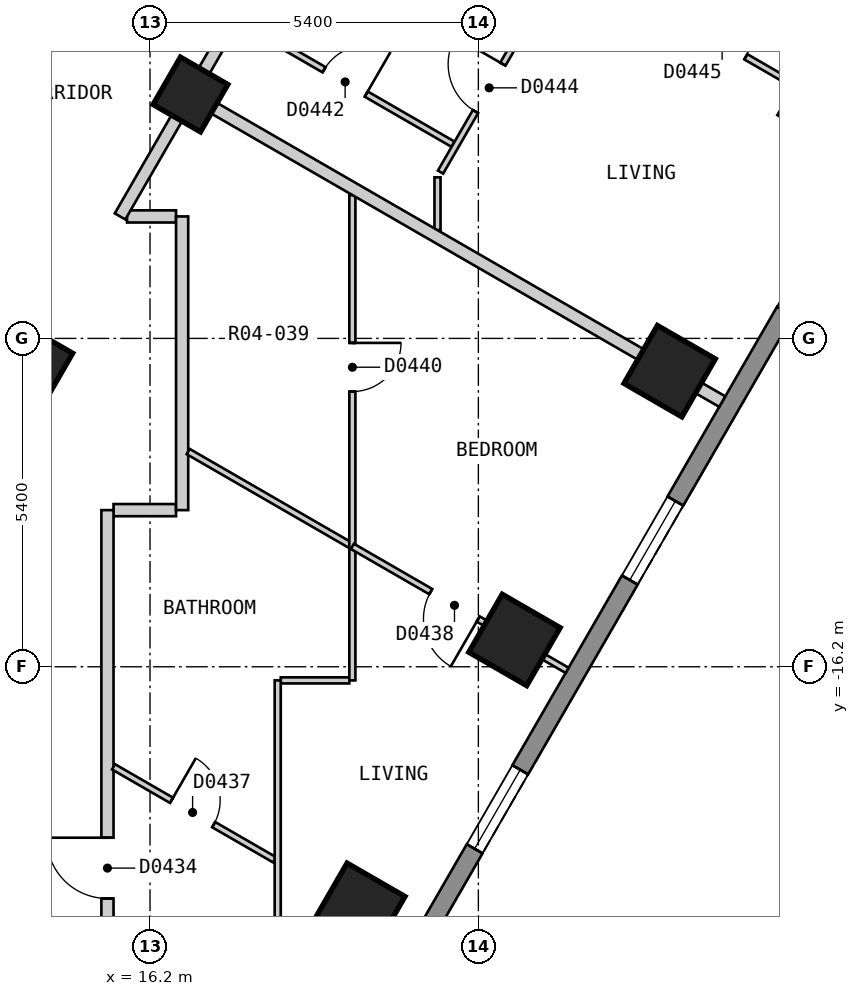
"""IFC4 building model, lengths in metres.
Left out: names, types, materials, properties, quantities, classifications, styles, units other than length and angle.
Written with IfcOpenShell. Run it as: python <this file> out.ifc"""

import sys

from ifc_helpers import new_model, si_unit, direction, frame, frame_2d, origin, origin_2d, place, context, subcontext, project, spatial, polyline, rectangle, outline, extrude, element, fill, save


model = new_model("IFC4")
c1 = context("Model", 3, precision=1e-05, world=origin(), true_north=direction((0.0, 1.0)))
c2 = subcontext(c1, "Body", "Model", "MODEL_VIEW")
j1 = project(units=[si_unit("LENGTHUNIT", "METRE"), si_unit("PLANEANGLEUNIT", "RADIAN")], contexts=[c1])
p1 = place(None, origin())
s1 = spatial("IfcSite", under=j1, at=p1, CompositionType="ELEMENT")
p2 = place(p1, origin())
s2 = spatial("IfcBuilding", under=s1, at=p2, CompositionType="ELEMENT")
p3 = place(p2, frame((0.0, 0.0, 32.4)))
s3 = spatial("IfcBuildingStorey", under=s2, at=p3, CompositionType="ELEMENT", Elevation=32.4)
for number, where, z_axis, x_axis in (
    (1, (19.642, -20.18, 0.0), (0.0, 0.0, 1.0), (0.5, 0.866, 0.0)),
    (2, (22.194, -15.759, 0.0), (0.0, 0.0, 1.0), (0.5, 0.866, 0.0)),
    (3, (24.746, -11.339, 0.0), (0.0, 0.0, 1.0), (0.5, 0.866, 0.0)),
    (4, (27.298, -6.919, 0.0), (0.0, 0.0, 1.0), (0.5, 0.866, 0.0)),
):
    element("IfcColumn", number, at=place(p3, frame(where, z_axis=z_axis, x_axis=x_axis)), inside=s3, PredefinedType="COLUMN", context=c2, shape_type="SweptSolid", body=[
        extrude(rectangle(XDim=1.1, YDim=1.1, at=origin_2d()), origin(), (0.0, 0.0, 1.0), 3.0),
    ])
for number, where, z_axis, x_axis in (
    (5, (14.313, -11.209, 0.0), (0.0, 0.0, 1.0), (0.5, 0.866, 0.0)),
    (6, (16.865, -6.789, 0.0), (0.0, 0.0, 1.0), (0.5, 0.866, 0.0)),
):
    element("IfcColumn", number, at=place(p3, frame(where, z_axis=z_axis, x_axis=x_axis)), inside=s3, PredefinedType="COLUMN", context=c2, shape_type="SweptSolid", body=[
        extrude(rectangle(XDim=0.9, YDim=0.9, at=origin_2d()), origin(), (0.0, 0.0, 1.0), 3.0),
    ])
p4 = place(p3, frame((17.71, -25.825, 0.0), z_axis=(0.0, 0.0, 1.0), x_axis=(0.500001938803, 0.866024284413, 0.0)))
e7 = element("IfcWall", 7, at=p4, inside=s3, PredefinedType="SOLIDWALL", context=c2, shape_type="SweptSolid", body=[
    extrude(outline(polyline([(0.0, -0.15), (27.02, -0.15), (26.94, 0.15), (0.08, 0.15), (0.0, -0.15)])), origin(), (0.0, 0.0, 1.0), 2.7),
])
p5 = place(p4, frame((2.553, 0.0, 0.15)))
e8 = element("IfcOpeningElement", 8, at=p5, cuts=e7, PredefinedType="OPENING", context=c2, shape_type="SweptSolid", body=[
    extrude(rectangle(XDim=1.5, YDim=2.1, at=frame_2d((0.75, 1.05))), frame((0.0, 0.16, 0.0), z_axis=(0.0, -1.0, 0.0), x_axis=(1.0, 0.0, 0.0)), (0.0, 0.0, 1.0), 0.32),
])
p6 = place(p4, frame((7.658, 0.0, 0.15)))
e9 = element("IfcOpeningElement", 9, at=p6, cuts=e7, PredefinedType="OPENING", context=c2, shape_type="SweptSolid", body=[
    extrude(rectangle(XDim=1.5, YDim=2.1, at=frame_2d((0.75, 1.05))), frame((0.0, 0.16, 0.0), z_axis=(0.0, -1.0, 0.0), x_axis=(1.0, 0.0, 0.0)), (0.0, 0.0, 1.0), 0.32),
])
p7 = place(p4, frame((12.761, 0.0, 0.15)))
e10 = element("IfcOpeningElement", 10, at=p7, cuts=e7, PredefinedType="OPENING", context=c2, shape_type="SweptSolid", body=[
    extrude(rectangle(XDim=1.5, YDim=2.1, at=frame_2d((0.75, 1.05))), frame((0.0, 0.16, 0.0), z_axis=(0.0, -1.0, 0.0), x_axis=(1.0, 0.0, 0.0)), (0.0, 0.0, 1.0), 0.32),
])
p8 = place(p4, frame((17.865, 0.0, 0.15)))
e11 = element("IfcOpeningElement", 11, at=p8, cuts=e7, PredefinedType="OPENING", context=c2, shape_type="SweptSolid", body=[
    extrude(rectangle(XDim=1.5, YDim=2.1, at=frame_2d((0.75, 1.05))), frame((0.0, 0.16, 0.0), z_axis=(0.0, -1.0, 0.0), x_axis=(1.0, 0.0, 0.0)), (0.0, 0.0, 1.0), 0.32),
])
p9 = place(p4, frame((22.969, 0.0, 0.15)))
e12 = element("IfcOpeningElement", 12, at=p9, cuts=e7, PredefinedType="OPENING", context=c2, shape_type="SweptSolid", body=[
    extrude(rectangle(XDim=1.5, YDim=2.1, at=frame_2d((0.75, 1.05))), frame((0.0, 0.16, 0.0), z_axis=(0.0, -1.0, 0.0), x_axis=(1.0, 0.0, 0.0)), (0.0, 0.0, 1.0), 0.32),
])
p10 = place(p3, frame((15.822, -8.794, 0.0), z_axis=(0.0, 0.0, 1.0), x_axis=(1.0, 0.0, 0.0)))
e13 = element("IfcWall", 13, at=p10, inside=s3, PredefinedType="PARTITIONING", context=c2, shape_type="SweptSolid", body=[
    extrude(rectangle(XDim=0.806, YDim=0.2, at=frame_2d((0.403, 0.0))), origin(), (0.0, 0.0, 1.0), 2.7),
])
p11 = place(p3, frame((15.6, -13.624, 0.0), z_axis=(0.0, 0.0, 1.0), x_axis=(1.0, 0.0, 0.0)))
e14 = element("IfcWall", 14, at=p11, inside=s3, PredefinedType="PARTITIONING", context=c2, shape_type="SweptSolid", body=[
    extrude(rectangle(XDim=1.028, YDim=0.2, at=frame_2d((0.514, 0.0))), origin(), (0.0, 0.0, 1.0), 2.7),
])
p12 = place(p3, frame((15.707, -8.794, 0.0), z_axis=(0.0, 0.0, 1.0), x_axis=(0.500016151272, 0.866016078642, 0.0)))
e15 = element("IfcWall", 15, at=p12, inside=s3, PredefinedType="PARTITIONING", context=c2, shape_type="SweptSolid", body=[
    extrude(rectangle(XDim=10.098, YDim=0.2, at=frame_2d((5.049, 0.0))), origin(), (0.0, 0.0, 1.0), 2.7),
])
p13 = place(p12, frame((4.367, 0.0, 0.0)))
e16 = element("IfcOpeningElement", 16, at=p13, cuts=e15, PredefinedType="OPENING", context=c2, shape_type="SweptSolid", body=[
    extrude(rectangle(XDim=1.0, YDim=2.1, at=frame_2d((0.5, 1.05))), frame((0.0, 0.11, 0.0), z_axis=(0.0, -1.0, 0.0), x_axis=(1.0, 0.0, 0.0)), (0.0, 0.0, 1.0), 0.22),
])
p14 = place(p3, frame((15.5, -21.199, 0.0), z_axis=(0.0, 0.0, 1.0), x_axis=(0.0, 1.0, 0.0)))
e17 = element("IfcWall", 17, at=p14, inside=s3, PredefinedType="PARTITIONING", context=c2, shape_type="SweptSolid", body=[
    extrude(rectangle(XDim=7.575, YDim=0.2, at=frame_2d((3.788, 0.0))), origin(), (0.0, 0.0, 1.0), 2.7),
])
p15 = place(p14, frame((1.188, 0.0, 0.0)))
e18 = element("IfcOpeningElement", 18, at=p15, cuts=e17, PredefinedType="OPENING", context=c2, shape_type="SweptSolid", body=[
    extrude(rectangle(XDim=1.0, YDim=2.1, at=frame_2d((0.5, 1.05))), frame((0.0, 0.11, 0.0), z_axis=(0.0, -1.0, 0.0), x_axis=(1.0, 0.0, 0.0)), (0.0, 0.0, 1.0), 0.22),
])
p16 = place(p3, frame((16.728, -13.624, 0.0), z_axis=(0.0, 0.0, 1.0), x_axis=(0.0, 1.0, 0.0)))
e19 = element("IfcWall", 19, at=p16, inside=s3, PredefinedType="PARTITIONING", context=c2, shape_type="SweptSolid", body=[
    extrude(rectangle(XDim=4.83, YDim=0.2, at=frame_2d((2.415, 0.0))), origin(), (0.0, 0.0, 1.0), 2.7),
])
p17 = place(p3, frame((15.6, -17.846, 0.0), z_axis=(0.0, 0.0, 1.0), x_axis=(0.866148385016, -0.499786929736, 0.0)))
e20 = element("IfcWall", 20, at=p17, inside=s3, PredefinedType="PARTITIONING", context=c2, shape_type="SweptSolid", body=[
    extrude(rectangle(XDim=3.059, YDim=0.1, at=frame_2d((1.53, 0.0))), origin(), (0.0, 0.0, 1.0), 2.7),
])
p18 = place(p17, frame((1.101, 0.0, 0.0)))
e21 = element("IfcOpeningElement", 21, at=p18, cuts=e20, PredefinedType="OPENING", context=c2, shape_type="SweptSolid", body=[
    extrude(rectangle(XDim=0.8, YDim=2.1, at=frame_2d((0.4, 1.05))), frame((0.0, 0.06, 0.0), z_axis=(0.0, -1.0, 0.0), x_axis=(1.0, 0.0, 0.0)), (0.0, 0.0, 1.0), 0.12),
])
p19 = place(p3, frame((16.828, -12.661, 0.0), z_axis=(0.0, 0.0, 1.0), x_axis=(0.866008246423, -0.500029716244, 0.0)))
e22 = element("IfcWall", 22, at=p19, inside=s3, PredefinedType="PARTITIONING", context=c2, shape_type="SweptSolid", body=[
    extrude(rectangle(XDim=3.118, YDim=0.1, at=frame_2d((1.559, 0.0))), origin(), (0.0, 0.0, 1.0), 2.7),
])
p20 = place(p3, frame((17.677, -5.582, 0.0), z_axis=(0.0, 0.0, 1.0), x_axis=(0.866015917575, -0.500016430238, 0.0)))
e23 = element("IfcWall", 23, at=p20, inside=s3, PredefinedType="PARTITIONING", context=c2, shape_type="SweptSolid", body=[
    extrude(rectangle(XDim=4.05, YDim=0.1, at=frame_2d((2.025, 0.0))), origin(), (0.0, 0.0, 1.0), 2.7),
])
p21 = place(p20, frame((1.6, 0.0, 0.0)))
e24 = element("IfcOpeningElement", 24, at=p21, cuts=e23, PredefinedType="OPENING", context=c2, shape_type="SweptSolid", body=[
    extrude(rectangle(XDim=0.8, YDim=2.1, at=frame_2d((0.4, 1.05))), frame((0.0, 0.06, 0.0), z_axis=(0.0, -1.0, 0.0), x_axis=(1.0, 0.0, 0.0)), (0.0, 0.0, 1.0), 0.12),
])
p22 = place(p3, frame((19.503, -2.419, 0.0), z_axis=(0.0, 0.0, 1.0), x_axis=(0.866047370643, -0.499961950354, 0.0)))
e25 = element("IfcWall", 25, at=p22, inside=s3, PredefinedType="PARTITIONING", context=c2, shape_type="SweptSolid", body=[
    extrude(rectangle(XDim=10.001, YDim=0.1, at=frame_2d((5.0, 0.0))), origin(), (0.0, 0.0, 1.0), 2.7),
])
p23 = place(p22, frame((6.6, 0.0, 0.0)))
e26 = element("IfcOpeningElement", 26, at=p23, cuts=e25, PredefinedType="OPENING", context=c2, shape_type="SweptSolid", body=[
    extrude(rectangle(XDim=0.9, YDim=2.1, at=frame_2d((0.45, 1.05))), frame((0.0, 0.06, 0.0), z_axis=(0.0, -1.0, 0.0), x_axis=(1.0, 0.0, 0.0)), (0.0, 0.0, 1.0), 0.12),
])
p24 = place(p3, frame((18.35, -16.424, 0.0), z_axis=(0.0, 0.0, 1.0), x_axis=(1.0, 0.0, 0.0)))
e27 = element("IfcWall", 27, at=p24, inside=s3, PredefinedType="PARTITIONING", context=c2, shape_type="SweptSolid", body=[
    extrude(rectangle(XDim=1.128, YDim=0.1, at=frame_2d((0.564, 0.0))), origin(), (0.0, 0.0, 1.0), 2.7),
])
p25 = place(p3, frame((20.978, -8.065, 0.0), z_axis=(0.0, 0.0, 1.0), x_axis=(0.499965068118, 0.866045570776, 0.0)))
e28 = element("IfcWall", 28, at=p25, inside=s3, PredefinedType="PARTITIONING", context=c2, shape_type="SweptSolid", body=[
    extrude(rectangle(XDim=4.152, YDim=0.1, at=frame_2d((2.076, 0.0))), origin(), (0.0, 0.0, 1.0), 2.7),
])
p26 = place(p25, frame((1.15, 0.0, 0.0)))
e29 = element("IfcOpeningElement", 29, at=p26, cuts=e28, PredefinedType="OPENING", context=c2, shape_type="SweptSolid", body=[
    extrude(rectangle(XDim=0.9, YDim=2.1, at=frame_2d((0.45, 1.05))), frame((0.0, 0.06, 0.0), z_axis=(0.0, -1.0, 0.0), x_axis=(1.0, 0.0, 0.0)), (0.0, 0.0, 1.0), 0.12),
])
p27 = place(p3, frame((18.3, -24.0, 0.0), z_axis=(0.0, 0.0, 1.0), x_axis=(0.0, 1.0, 0.0)))
e30 = element("IfcWall", 30, at=p27, inside=s3, PredefinedType="PARTITIONING", context=c2, shape_type="SweptSolid", body=[
    extrude(rectangle(XDim=7.576, YDim=0.1, at=frame_2d((3.788, 0.0))), origin(), (0.0, 0.0, 1.0), 2.7),
])
p28 = place(p3, frame((19.528, -16.424, 0.0), z_axis=(0.0, 0.0, 1.0), x_axis=(0.0, 1.0, 0.0)))
e31 = element("IfcWall", 31, at=p28, inside=s3, PredefinedType="PARTITIONING", context=c2, shape_type="SweptSolid", body=[
    extrude(rectangle(XDim=7.982, YDim=0.1, at=frame_2d((3.991, 0.0))), origin(), (0.0, 0.0, 1.0), 2.7),
])
p29 = place(p28, frame((4.75, 0.0, 0.0)))
e32 = element("IfcOpeningElement", 32, at=p29, cuts=e31, PredefinedType="OPENING", context=c2, shape_type="SweptSolid", body=[
    extrude(rectangle(XDim=0.8, YDim=2.1, at=frame_2d((0.4, 1.05))), frame((0.0, 0.06, 0.0), z_axis=(0.0, -1.0, 0.0), x_axis=(1.0, 0.0, 0.0)), (0.0, 0.0, 1.0), 0.12),
])
p30 = place(p3, frame((20.928, -9.02, 0.0), z_axis=(0.0, 0.0, 1.0), x_axis=(0.0, 1.0, 0.0)))
e33 = element("IfcWall", 33, at=p30, inside=s3, PredefinedType="PARTITIONING", context=c2, shape_type="SweptSolid", body=[
    extrude(rectangle(XDim=0.869, YDim=0.1, at=frame_2d((0.435, 0.0))), origin(), (0.0, 0.0, 1.0), 2.7),
])
p31 = place(p3, frame((16.951, -6.839, 0.0), z_axis=(0.0, 0.0, 1.0), x_axis=(0.866022959057, -0.500004234368, 0.0)))
e34 = element("IfcWall", 34, at=p31, inside=s3, PredefinedType="PARTITIONING", context=c2, shape_type="SweptSolid", body=[
    extrude(rectangle(XDim=10.0, YDim=0.2, at=frame_2d((5.0, 0.0))), origin(), (0.0, 0.0, 1.0), 2.7),
])
p32 = place(p3, frame((19.528, -14.22, 0.0), z_axis=(0.0, 0.0, 1.0), x_axis=(0.866039047082, -0.499976368371, 0.0)))
e35 = element("IfcWall", 35, at=p32, inside=s3, PredefinedType="PARTITIONING", context=c2, shape_type="SweptSolid", body=[
    extrude(rectangle(XDim=4.078, YDim=0.1, at=frame_2d((2.039, 0.0))), origin(), (0.0, 0.0, 1.0), 2.7),
])
p33 = place(p32, frame((1.489, 0.0, 0.0)))
e36 = element("IfcOpeningElement", 36, at=p33, cuts=e35, PredefinedType="OPENING", context=c2, shape_type="SweptSolid", body=[
    extrude(rectangle(XDim=0.9, YDim=2.1, at=frame_2d((0.45, 1.05))), frame((0.0, 0.06, 0.0), z_axis=(0.0, -1.0, 0.0), x_axis=(1.0, 0.0, 0.0)), (0.0, 0.0, 1.0), 0.12),
])
p34 = place(p6, origin())
e37 = element("IfcWindow", 37, at=p34, inside=s3, PartitioningType="SINGLE_PANEL", PredefinedType="WINDOW", context=c2, shape_type="SweptSolid", body=[
    extrude(rectangle(XDim=1.5, YDim=2.1, at=frame_2d((0.75, 1.05))), frame((0.0, 0.03, 0.0), z_axis=(0.0, -1.0, 0.0), x_axis=(1.0, 0.0, 0.0)), (0.0, 0.0, 1.0), 0.06),
])
fill(e9, e37)
p35 = place(p7, origin())
e38 = element("IfcWindow", 38, at=p35, inside=s3, PartitioningType="SINGLE_PANEL", PredefinedType="WINDOW", context=c2, shape_type="SweptSolid", body=[
    extrude(rectangle(XDim=1.5, YDim=2.1, at=frame_2d((0.75, 1.05))), frame((0.0, 0.03, 0.0), z_axis=(0.0, -1.0, 0.0), x_axis=(1.0, 0.0, 0.0)), (0.0, 0.0, 1.0), 0.06),
])
fill(e10, e38)
p36 = place(p15, origin())
e39 = element("IfcDoor", 39, at=p36, inside=s3, OperationType="SINGLE_SWING_RIGHT", PredefinedType="DOOR", context=c2, shape_type="SweptSolid", body=[
    extrude(rectangle(XDim=1.0, YDim=2.1, at=frame_2d((0.5, 1.05))), frame((0.0, 0.025, 0.0), z_axis=(0.0, -1.0, 0.0), x_axis=(1.0, 0.0, 0.0)), (0.0, 0.0, 1.0), 0.05),
])
fill(e18, e39)
p37 = place(p18, origin())
e40 = element("IfcDoor", 40, at=p37, inside=s3, OperationType="SINGLE_SWING_LEFT", PredefinedType="DOOR", context=c2, shape_type="SweptSolid", body=[
    extrude(rectangle(XDim=0.8, YDim=2.1, at=frame_2d((0.4, 1.05))), frame((0.0, 0.025, 0.0), z_axis=(0.0, -1.0, 0.0), x_axis=(1.0, 0.0, 0.0)), (0.0, 0.0, 1.0), 0.05),
])
fill(e21, e40)
p38 = place(p33, origin())
e41 = element("IfcDoor", 41, at=p38, inside=s3, OperationType="SINGLE_SWING_RIGHT", PredefinedType="DOOR", context=c2, shape_type="SweptSolid", body=[
    extrude(rectangle(XDim=0.9, YDim=2.1, at=frame_2d((0.45, 1.05))), frame((0.0, 0.025, 0.0), z_axis=(0.0, -1.0, 0.0), x_axis=(1.0, 0.0, 0.0)), (0.0, 0.0, 1.0), 0.05),
])
fill(e36, e41)
p39 = place(p29, origin())
e42 = element("IfcDoor", 42, at=p39, inside=s3, OperationType="SINGLE_SWING_RIGHT", PredefinedType="DOOR", context=c2, shape_type="SweptSolid", body=[
    extrude(rectangle(XDim=0.8, YDim=2.1, at=frame_2d((0.4, 1.05))), frame((0.0, 0.025, 0.0), z_axis=(0.0, -1.0, 0.0), x_axis=(1.0, 0.0, 0.0)), (0.0, 0.0, 1.0), 0.05),
])
fill(e32, e42)
p40 = place(p21, origin())
e43 = element("IfcDoor", 43, at=p40, inside=s3, OperationType="SINGLE_SWING_RIGHT", PredefinedType="DOOR", context=c2, shape_type="SweptSolid", body=[
    extrude(rectangle(XDim=0.8, YDim=2.1, at=frame_2d((0.4, 1.05))), frame((0.0, 0.025, 0.0), z_axis=(0.0, -1.0, 0.0), x_axis=(1.0, 0.0, 0.0)), (0.0, 0.0, 1.0), 0.05),
])
fill(e24, e43)
p41 = place(p26, origin())
e44 = element("IfcDoor", 44, at=p41, inside=s3, OperationType="SINGLE_SWING_RIGHT", PredefinedType="DOOR", context=c2, shape_type="SweptSolid", body=[
    extrude(rectangle(XDim=0.9, YDim=2.1, at=frame_2d((0.45, 1.05))), frame((0.0, 0.025, 0.0), z_axis=(0.0, -1.0, 0.0), x_axis=(1.0, 0.0, 0.0)), (0.0, 0.0, 1.0), 0.05),
])
fill(e29, e44)
p42 = place(p23, origin())
e45 = element("IfcDoor", 45, at=p42, inside=s3, OperationType="SINGLE_SWING_LEFT", PredefinedType="DOOR", context=c2, shape_type="SweptSolid", body=[
    extrude(rectangle(XDim=0.9, YDim=2.1, at=frame_2d((0.45, 1.05))), frame((0.0, 0.025, 0.0), z_axis=(0.0, -1.0, 0.0), x_axis=(1.0, 0.0, 0.0)), (0.0, 0.0, 1.0), 0.05),
])
fill(e26, e45)
save(model, sys.argv[1])
